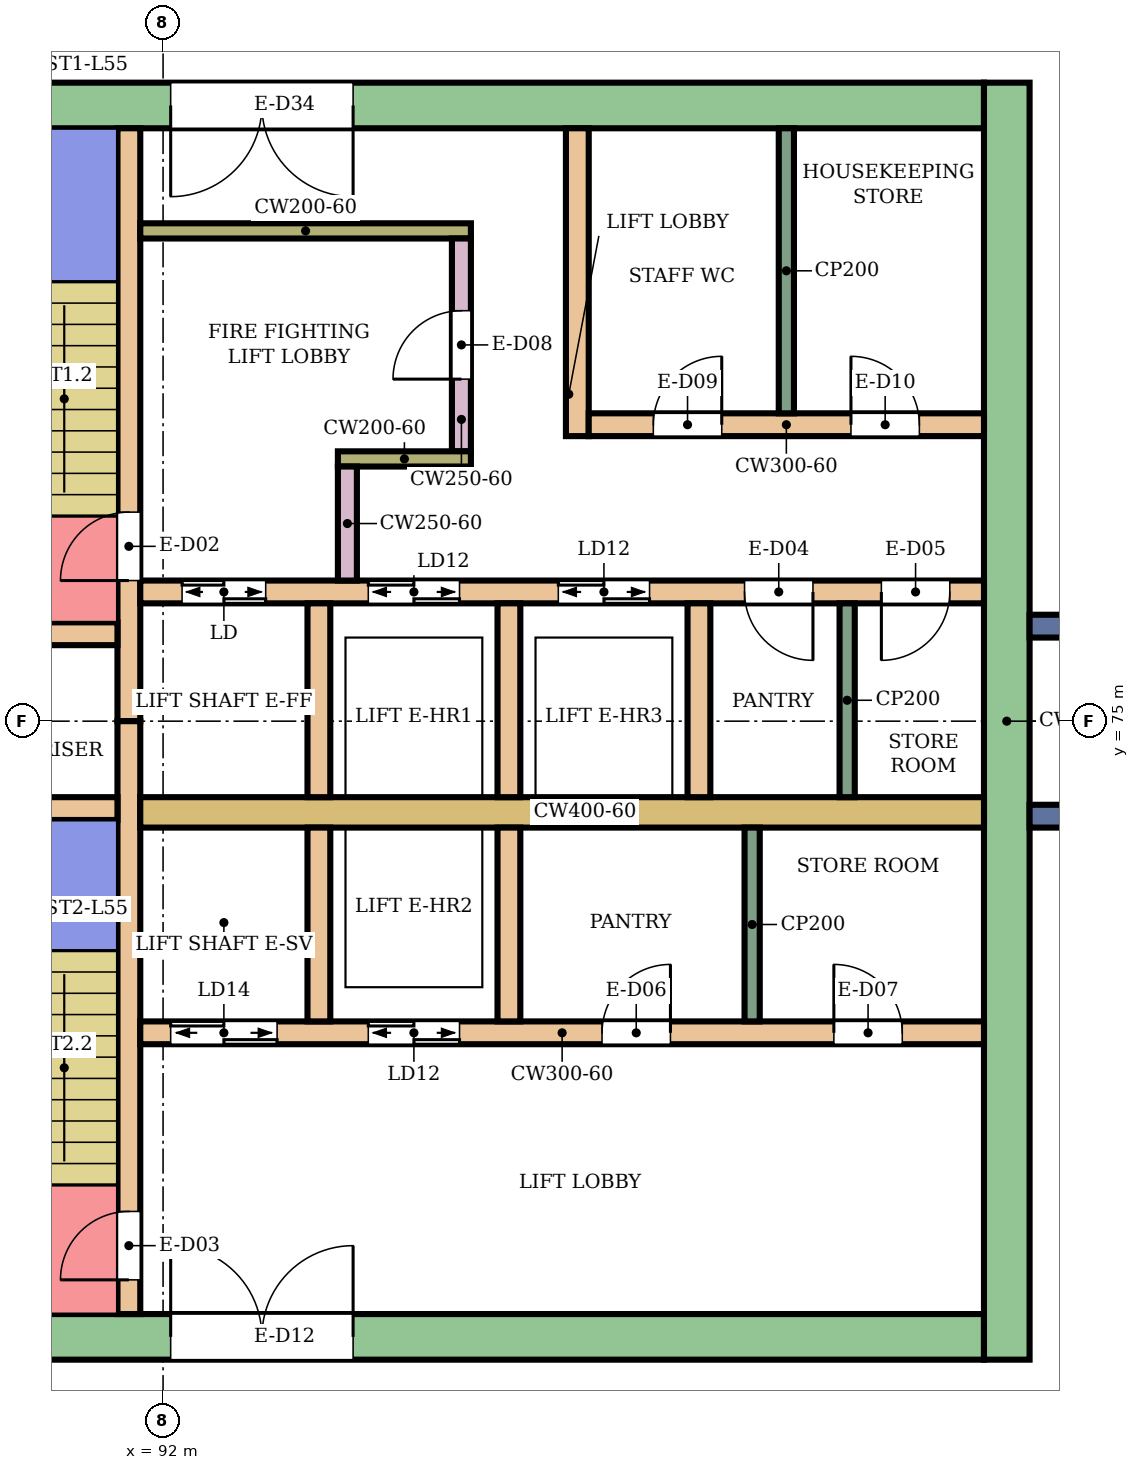
"""IFC4 building model, lengths in metres.
Left out: names, types, materials, properties, quantities, classifications, styles, units other than length and angle.
Written with IfcOpenShell. Run it as: python <this file> out.ifc"""

import sys

from ifc_helpers import new_model, si_unit, direction, frame, frame_2d, origin, place, context, subcontext, project, spatial, rectangle, extrude, element, fill, save


model = new_model("IFC4")
c1 = context("Model", 3, precision=1e-05, world=origin(), true_north=direction((0.0, 1.0)))
c2 = subcontext(c1, "Body", "Model", "MODEL_VIEW")
j1 = project(units=[si_unit("LENGTHUNIT", "METRE"), si_unit("PLANEANGLEUNIT", "RADIAN")], contexts=[c1])
p1 = place(None, origin())
s1 = spatial("IfcSite", under=j1, at=p1, CompositionType="ELEMENT")
p2 = place(p1, origin())
s2 = spatial("IfcBuilding", under=s1, at=p2, CompositionType="ELEMENT")
p3 = place(p2, frame((0.0, 0.0, 241.5)))
s3 = spatial("IfcBuildingStorey", under=s2, at=p3, CompositionType="ELEMENT", Elevation=241.5)
p4 = place(p3, frame((87.9, 83.1, 0.0), z_axis=(0.0, 0.0, 1.0), x_axis=(1.0, 0.0, 0.0)))
e1 = element("IfcWall", 1, at=p4, inside=s3, PredefinedType="SHEAR", context=c2, shape_type="SweptSolid", body=[
    extrude(rectangle(XDim=14.9, YDim=0.6, at=frame_2d((7.45, 0.0))), origin(), (0.0, 0.0, 1.0), 3.88),
])
p5 = place(p4, frame((4.2, 0.0, 0.0)))
e2 = element("IfcOpeningElement", 2, at=p5, cuts=e1, PredefinedType="OPENING", context=c2, shape_type="SweptSolid", body=[
    extrude(rectangle(XDim=2.4, YDim=2.4, at=frame_2d((1.2, 1.2))), frame((0.0, 0.31, 0.0), z_axis=(0.0, -1.0, 0.0), x_axis=(1.0, 0.0, 0.0)), (0.0, 0.0, 1.0), 0.62),
])
p6 = place(p3, frame((87.9, 66.9, 0.0), z_axis=(0.0, 0.0, 1.0), x_axis=(1.0, 0.0, 0.0)))
e3 = element("IfcWall", 3, at=p6, inside=s3, PredefinedType="SHEAR", context=c2, shape_type="SweptSolid", body=[
    extrude(rectangle(XDim=14.9, YDim=0.6, at=frame_2d((7.45, 0.0))), origin(), (0.0, 0.0, 1.0), 3.88),
])
p7 = place(p6, frame((4.2, 0.0, 0.0)))
e4 = element("IfcOpeningElement", 4, at=p7, cuts=e3, PredefinedType="OPENING", context=c2, shape_type="SweptSolid", body=[
    extrude(rectangle(XDim=2.4, YDim=2.4, at=frame_2d((1.2, 1.2))), frame((0.0, 0.31, 0.0), z_axis=(0.0, -1.0, 0.0), x_axis=(1.0, 0.0, 0.0)), (0.0, 0.0, 1.0), 0.62),
])
p8 = place(p3, frame((103.1, 66.6, 0.0), z_axis=(0.0, 0.0, 1.0), x_axis=(0.0, 1.0, 0.0)))
e5 = element("IfcWall", 5, at=p8, inside=s3, PredefinedType="SHEAR", context=c2, shape_type="SweptSolid", body=[
    extrude(rectangle(XDim=16.8, YDim=0.6, at=frame_2d((8.4, 0.0))), origin(), (0.0, 0.0, 1.0), 3.88),
])
p9 = place(p3, frame((91.55, 75.0, 0.0), z_axis=(0.0, 0.0, 1.0), x_axis=(0.0, 1.0, 0.0)))
e6 = element("IfcWall", 6, at=p9, inside=s3, PredefinedType="SHEAR", context=c2, shape_type="SweptSolid", body=[
    extrude(rectangle(XDim=7.8, YDim=0.3, at=frame_2d((3.9, 0.0))), origin(), (0.0, 0.0, 1.0), 3.88),
])
p10 = place(p9, frame((1.85, 0.0, 0.0)))
e7 = element("IfcOpeningElement", 7, at=p10, cuts=e6, PredefinedType="OPENING", context=c2, shape_type="SweptSolid", body=[
    extrude(rectangle(XDim=0.9, YDim=2.1, at=frame_2d((0.45, 1.05))), frame((0.0, 0.16, 0.0), z_axis=(0.0, -1.0, 0.0), x_axis=(1.0, 0.0, 0.0)), (0.0, 0.0, 1.0), 0.32),
])
p11 = place(p3, frame((91.55, 67.2, 0.0), z_axis=(0.0, 0.0, 1.0), x_axis=(0.0, 1.0, 0.0)))
e8 = element("IfcWall", 8, at=p11, inside=s3, PredefinedType="SHEAR", context=c2, shape_type="SweptSolid", body=[
    extrude(rectangle(XDim=7.8, YDim=0.3, at=frame_2d((3.9, 0.0))), origin(), (0.0, 0.0, 1.0), 3.88),
])
p12 = place(p11, frame((0.45, 0.0, 0.0)))
e9 = element("IfcOpeningElement", 9, at=p12, cuts=e8, PredefinedType="OPENING", context=c2, shape_type="SweptSolid", body=[
    extrude(rectangle(XDim=0.9, YDim=2.1, at=frame_2d((0.45, 1.05))), frame((0.0, 0.16, 0.0), z_axis=(0.0, -1.0, 0.0), x_axis=(1.0, 0.0, 0.0)), (0.0, 0.0, 1.0), 0.32),
])
p13 = place(p3, frame((88.35, 76.15, 0.0), z_axis=(0.0, 0.0, 1.0), x_axis=(1.0, 0.0, 0.0)))
e10 = element("IfcWall", 10, at=p13, inside=s3, PredefinedType="SHEAR", context=c2, shape_type="SweptSolid", body=[
    extrude(rectangle(XDim=3.05, YDim=0.3, at=frame_2d((1.525, 0.0))), origin(), (0.0, 0.0, 1.0), 3.88),
])
p14 = place(p13, frame((1.1, 0.0, 0.0)))
e11 = element("IfcOpeningElement", 11, at=p14, cuts=e10, PredefinedType="OPENING", context=c2, shape_type="SweptSolid", body=[
    extrude(rectangle(XDim=0.7, YDim=2.0, at=frame_2d((0.35, 1.0))), frame((0.0, 0.16, 0.0), z_axis=(0.0, -1.0, 0.0), x_axis=(1.0, 0.0, 0.0)), (0.0, 0.0, 1.0), 0.32),
])
p15 = place(p3, frame((88.35, 73.85, 0.0), z_axis=(0.0, 0.0, 1.0), x_axis=(1.0, 0.0, 0.0)))
e12 = element("IfcWall", 12, at=p15, inside=s3, PredefinedType="SHEAR", context=c2, shape_type="SweptSolid", body=[
    extrude(rectangle(XDim=3.05, YDim=0.3, at=frame_2d((1.525, 0.0))), origin(), (0.0, 0.0, 1.0), 3.88),
])
p16 = place(p3, frame((91.7, 76.7, 0.0), z_axis=(0.0, 0.0, 1.0), x_axis=(1.0, 0.0, 0.0)))
e13 = element("IfcWall", 13, at=p16, inside=s3, PredefinedType="SHEAR", context=c2, shape_type="SweptSolid", body=[
    extrude(rectangle(XDim=11.1, YDim=0.3, at=frame_2d((5.55, 0.0))), origin(), (0.0, 0.0, 1.0), 3.88),
])
p17 = place(p16, frame((0.55, 0.0, 0.0)))
e14 = element("IfcOpeningElement", 14, at=p17, cuts=e13, PredefinedType="OPENING", context=c2, shape_type="SweptSolid", body=[
    extrude(rectangle(XDim=1.1, YDim=2.1, at=frame_2d((0.55, 1.05))), frame((0.0, 0.16, 0.0), z_axis=(0.0, -1.0, 0.0), x_axis=(1.0, 0.0, 0.0)), (0.0, 0.0, 1.0), 0.32),
])
p18 = place(p16, frame((3.0, 0.0, 0.0)))
e15 = element("IfcOpeningElement", 15, at=p18, cuts=e13, PredefinedType="OPENING", context=c2, shape_type="SweptSolid", body=[
    extrude(rectangle(XDim=1.2, YDim=2.1, at=frame_2d((0.6, 1.05))), frame((0.0, 0.16, 0.0), z_axis=(0.0, -1.0, 0.0), x_axis=(1.0, 0.0, 0.0)), (0.0, 0.0, 1.0), 0.32),
])
p19 = place(p16, frame((5.5, 0.0, 0.0)))
e16 = element("IfcOpeningElement", 16, at=p19, cuts=e13, PredefinedType="OPENING", context=c2, shape_type="SweptSolid", body=[
    extrude(rectangle(XDim=1.2, YDim=2.1, at=frame_2d((0.6, 1.05))), frame((0.0, 0.16, 0.0), z_axis=(0.0, -1.0, 0.0), x_axis=(1.0, 0.0, 0.0)), (0.0, 0.0, 1.0), 0.32),
])
p20 = place(p16, frame((7.95, 0.0, 0.0)))
e17 = element("IfcOpeningElement", 17, at=p20, cuts=e13, PredefinedType="OPENING", context=c2, shape_type="SweptSolid", body=[
    extrude(rectangle(XDim=0.9, YDim=2.1, at=frame_2d((0.45, 1.05))), frame((0.0, 0.16, 0.0), z_axis=(0.0, -1.0, 0.0), x_axis=(1.0, 0.0, 0.0)), (0.0, 0.0, 1.0), 0.32),
])
p21 = place(p16, frame((9.75, 0.0, 0.0)))
e18 = element("IfcOpeningElement", 18, at=p21, cuts=e13, PredefinedType="OPENING", context=c2, shape_type="SweptSolid", body=[
    extrude(rectangle(XDim=0.9, YDim=2.1, at=frame_2d((0.45, 1.05))), frame((0.0, 0.16, 0.0), z_axis=(0.0, -1.0, 0.0), x_axis=(1.0, 0.0, 0.0)), (0.0, 0.0, 1.0), 0.32),
])
p22 = place(p3, frame((91.7, 73.8, 0.0), z_axis=(0.0, 0.0, 1.0), x_axis=(1.0, 0.0, 0.0)))
e19 = element("IfcWall", 19, at=p22, inside=s3, PredefinedType="SHEAR", context=c2, shape_type="SweptSolid", body=[
    extrude(rectangle(XDim=11.1, YDim=0.4, at=frame_2d((5.55, 0.0))), origin(), (0.0, 0.0, 1.0), 3.88),
])
p23 = place(p3, frame((91.7, 70.9, 0.0), z_axis=(0.0, 0.0, 1.0), x_axis=(1.0, 0.0, 0.0)))
e20 = element("IfcWall", 20, at=p23, inside=s3, PredefinedType="SHEAR", context=c2, shape_type="SweptSolid", body=[
    extrude(rectangle(XDim=11.1, YDim=0.3, at=frame_2d((5.55, 0.0))), origin(), (0.0, 0.0, 1.0), 3.88),
])
p24 = place(p23, frame((0.4, 0.0, 0.0)))
e21 = element("IfcOpeningElement", 21, at=p24, cuts=e20, PredefinedType="OPENING", context=c2, shape_type="SweptSolid", body=[
    extrude(rectangle(XDim=1.4, YDim=2.1, at=frame_2d((0.7, 1.05))), frame((0.0, 0.16, 0.0), z_axis=(0.0, -1.0, 0.0), x_axis=(1.0, 0.0, 0.0)), (0.0, 0.0, 1.0), 0.32),
])
p25 = place(p23, frame((3.0, 0.0, 0.0)))
e22 = element("IfcOpeningElement", 22, at=p25, cuts=e20, PredefinedType="OPENING", context=c2, shape_type="SweptSolid", body=[
    extrude(rectangle(XDim=1.2, YDim=2.1, at=frame_2d((0.6, 1.05))), frame((0.0, 0.16, 0.0), z_axis=(0.0, -1.0, 0.0), x_axis=(1.0, 0.0, 0.0)), (0.0, 0.0, 1.0), 0.32),
])
p26 = place(p23, frame((6.075, 0.0, 0.0)))
e23 = element("IfcOpeningElement", 23, at=p26, cuts=e20, PredefinedType="OPENING", context=c2, shape_type="SweptSolid", body=[
    extrude(rectangle(XDim=0.9, YDim=2.1, at=frame_2d((0.45, 1.05))), frame((0.0, 0.16, 0.0), z_axis=(0.0, -1.0, 0.0), x_axis=(1.0, 0.0, 0.0)), (0.0, 0.0, 1.0), 0.32),
])
p27 = place(p23, frame((9.125, 0.0, 0.0)))
e24 = element("IfcOpeningElement", 24, at=p27, cuts=e20, PredefinedType="OPENING", context=c2, shape_type="SweptSolid", body=[
    extrude(rectangle(XDim=0.9, YDim=2.1, at=frame_2d((0.45, 1.05))), frame((0.0, 0.16, 0.0), z_axis=(0.0, -1.0, 0.0), x_axis=(1.0, 0.0, 0.0)), (0.0, 0.0, 1.0), 0.32),
])
for number, where, z_axis, x_axis in (
    (25, (94.05, 74.0, 0.0), (0.0, 0.0, 1.0), (0.0, 1.0, 0.0)),
    (26, (96.55, 74.0, 0.0), (0.0, 0.0, 1.0), (0.0, 1.0, 0.0)),
    (27, (99.05, 74.0, 0.0), (0.0, 0.0, 1.0), (0.0, 1.0, 0.0)),
    (28, (94.05, 71.05, 0.0), (0.0, 0.0, 1.0), (0.0, 1.0, 0.0)),
    (29, (96.55, 71.05, 0.0), (0.0, 0.0, 1.0), (0.0, 1.0, 0.0)),
):
    element("IfcWall", number, at=place(p3, frame(where, z_axis=z_axis, x_axis=x_axis)), inside=s3, PredefinedType="SHEAR", context=c2, shape_type="SweptSolid", body=[
        extrude(rectangle(XDim=2.55, YDim=0.3, at=frame_2d((1.275, 0.0))), origin(), (0.0, 0.0, 1.0), 3.88),
    ])
p28 = place(p3, frame((91.7, 81.45, 0.0), z_axis=(0.0, 0.0, 1.0), x_axis=(1.0, 0.0, 0.0)))
e30 = element("IfcWall", 30, at=p28, inside=s3, PredefinedType="SHEAR", context=c2, shape_type="SweptSolid", body=[
    extrude(rectangle(XDim=4.35, YDim=0.2, at=frame_2d((2.175, 0.0))), origin(), (0.0, 0.0, 1.0), 3.88),
])
p29 = place(p3, frame((95.925, 78.55, 0.0), z_axis=(0.0, 0.0, 1.0), x_axis=(0.0, 1.0, 0.0)))
e31 = element("IfcWall", 31, at=p29, inside=s3, PredefinedType="SHEAR", context=c2, shape_type="SweptSolid", body=[
    extrude(rectangle(XDim=2.8, YDim=0.25, at=frame_2d((1.4, 0.0))), origin(), (0.0, 0.0, 1.0), 3.88),
])
p30 = place(p29, frame((0.95, 0.0, 0.0)))
e32 = element("IfcOpeningElement", 32, at=p30, cuts=e31, PredefinedType="OPENING", context=c2, shape_type="SweptSolid", body=[
    extrude(rectangle(XDim=0.9, YDim=2.1, at=frame_2d((0.45, 1.05))), frame((0.0, 0.135, 0.0), z_axis=(0.0, -1.0, 0.0), x_axis=(1.0, 0.0, 0.0)), (0.0, 0.0, 1.0), 0.27),
])
p31 = place(p3, frame((94.3, 78.45, 0.0), z_axis=(0.0, 0.0, 1.0), x_axis=(1.0, 0.0, 0.0)))
e33 = element("IfcWall", 33, at=p31, inside=s3, PredefinedType="SHEAR", context=c2, shape_type="SweptSolid", body=[
    extrude(rectangle(XDim=1.75, YDim=0.2, at=frame_2d((0.875, 0.0))), origin(), (0.0, 0.0, 1.0), 3.88),
])
p32 = place(p3, frame((94.425, 76.85, 0.0), z_axis=(0.0, 0.0, 1.0), x_axis=(0.0, 1.0, 0.0)))
e34 = element("IfcWall", 34, at=p32, inside=s3, PredefinedType="SHEAR", context=c2, shape_type="SweptSolid", body=[
    extrude(rectangle(XDim=1.5, YDim=0.25, at=frame_2d((0.75, 0.0))), origin(), (0.0, 0.0, 1.0), 3.88),
])
p33 = place(p3, frame((97.45, 78.75, 0.0), z_axis=(0.0, 0.0, 1.0), x_axis=(0.0, 1.0, 0.0)))
e35 = element("IfcWall", 35, at=p33, inside=s3, PredefinedType="SHEAR", context=c2, shape_type="SweptSolid", body=[
    extrude(rectangle(XDim=4.05, YDim=0.3, at=frame_2d((2.025, 0.0))), origin(), (0.0, 0.0, 1.0), 3.88),
])
p34 = place(p3, frame((97.6, 78.9, 0.0), z_axis=(0.0, 0.0, 1.0), x_axis=(1.0, 0.0, 0.0)))
e36 = element("IfcWall", 36, at=p34, inside=s3, PredefinedType="SHEAR", context=c2, shape_type="SweptSolid", body=[
    extrude(rectangle(XDim=5.2, YDim=0.3, at=frame_2d((2.6, 0.0))), origin(), (0.0, 0.0, 1.0), 3.88),
])
p35 = place(p34, frame((0.85, 0.0, 0.0)))
e37 = element("IfcOpeningElement", 37, at=p35, cuts=e36, PredefinedType="OPENING", context=c2, shape_type="SweptSolid", body=[
    extrude(rectangle(XDim=0.9, YDim=2.1, at=frame_2d((0.45, 1.05))), frame((0.0, 0.16, 0.0), z_axis=(0.0, -1.0, 0.0), x_axis=(1.0, 0.0, 0.0)), (0.0, 0.0, 1.0), 0.32),
])
p36 = place(p34, frame((3.45, 0.0, 0.0)))
e38 = element("IfcOpeningElement", 38, at=p36, cuts=e36, PredefinedType="OPENING", context=c2, shape_type="SweptSolid", body=[
    extrude(rectangle(XDim=0.9, YDim=2.1, at=frame_2d((0.45, 1.05))), frame((0.0, 0.16, 0.0), z_axis=(0.0, -1.0, 0.0), x_axis=(1.0, 0.0, 0.0)), (0.0, 0.0, 1.0), 0.32),
])
for number, where, z_axis, x_axis in (
    (39, (103.4, 73.75, 0.0), (0.0, 0.0, 1.0), (1.0, 0.0, 0.0)),
    (40, (103.4, 76.25, 0.0), (0.0, 0.0, 1.0), (1.0, 0.0, 0.0)),
):
    element("IfcWall", number, at=place(p3, frame(where, z_axis=z_axis, x_axis=x_axis)), inside=s3, PredefinedType="NOTDEFINED", context=c2, shape_type="SweptSolid", body=[
        extrude(rectangle(XDim=2.416, YDim=0.3, at=frame_2d((1.208, 0.0))), origin(), (0.0, 0.0, 1.0), 4.2),
    ])
for number, where, z_axis, x_axis in (
    (41, (101.0, 74.0, 0.0), (0.0, 0.0, 1.0), (0.0, 1.0, 0.0)),
    (42, (99.75, 71.05, 0.0), (0.0, 0.0, 1.0), (0.0, 1.0, 0.0)),
):
    element("IfcWall", number, at=place(p3, frame(where, z_axis=z_axis, x_axis=x_axis)), inside=s3, PredefinedType="PARTITIONING", context=c2, shape_type="SweptSolid", body=[
        extrude(rectangle(XDim=2.55, YDim=0.2, at=frame_2d((1.275, 0.0))), origin(), (0.0, 0.0, 1.0), 3.88),
    ])
p37 = place(p3, frame((100.2, 79.05, 0.0), z_axis=(0.0, 0.0, 1.0), x_axis=(0.0, 1.0, 0.0)))
e43 = element("IfcWall", 43, at=p37, inside=s3, PredefinedType="PARTITIONING", context=c2, shape_type="SweptSolid", body=[
    extrude(rectangle(XDim=3.75, YDim=0.2, at=frame_2d((1.875, 0.0))), origin(), (0.0, 0.0, 1.0), 3.88),
])
p38 = place(p10, origin())
e44 = element("IfcDoor", 44, at=p38, inside=s3, OperationType="SINGLE_SWING_LEFT", PredefinedType="DOOR", context=c2, shape_type="SweptSolid", body=[
    extrude(rectangle(XDim=0.9, YDim=2.1, at=frame_2d((0.45, 1.05))), frame((0.0, 0.025, 0.0), z_axis=(0.0, -1.0, 0.0), x_axis=(1.0, 0.0, 0.0)), (0.0, 0.0, 1.0), 0.05),
])
fill(e7, e44)
p39 = place(p12, origin())
e45 = element("IfcDoor", 45, at=p39, inside=s3, OperationType="SINGLE_SWING_LEFT", PredefinedType="DOOR", context=c2, shape_type="SweptSolid", body=[
    extrude(rectangle(XDim=0.9, YDim=2.1, at=frame_2d((0.45, 1.05))), frame((0.0, 0.025, 0.0), z_axis=(0.0, -1.0, 0.0), x_axis=(1.0, 0.0, 0.0)), (0.0, 0.0, 1.0), 0.05),
])
fill(e9, e45)
p40 = place(p17, origin())
e46 = element("IfcDoor", 46, at=p40, inside=s3, OperationType="DOUBLE_DOOR_SLIDING", PredefinedType="DOOR", context=c2, shape_type="SweptSolid", body=[
    extrude(rectangle(XDim=1.1, YDim=2.1, at=frame_2d((0.55, 1.05))), frame((0.0, 0.025, 0.0), z_axis=(0.0, -1.0, 0.0), x_axis=(1.0, 0.0, 0.0)), (0.0, 0.0, 1.0), 0.05),
])
fill(e14, e46)
p41 = place(p18, origin())
e47 = element("IfcDoor", 47, at=p41, inside=s3, OperationType="DOUBLE_DOOR_SLIDING", PredefinedType="DOOR", context=c2, shape_type="SweptSolid", body=[
    extrude(rectangle(XDim=1.2, YDim=2.1, at=frame_2d((0.6, 1.05))), frame((0.0, 0.025, 0.0), z_axis=(0.0, -1.0, 0.0), x_axis=(1.0, 0.0, 0.0)), (0.0, 0.0, 1.0), 0.05),
])
fill(e15, e47)
p42 = place(p19, origin())
e48 = element("IfcDoor", 48, at=p42, inside=s3, OperationType="DOUBLE_DOOR_SLIDING", PredefinedType="DOOR", context=c2, shape_type="SweptSolid", body=[
    extrude(rectangle(XDim=1.2, YDim=2.1, at=frame_2d((0.6, 1.05))), frame((0.0, 0.025, 0.0), z_axis=(0.0, -1.0, 0.0), x_axis=(1.0, 0.0, 0.0)), (0.0, 0.0, 1.0), 0.05),
])
fill(e16, e48)
p43 = place(p20, frame((0.9, 0.0, 0.0), z_axis=(0.0, 0.0, 1.0), x_axis=(-1.0, 0.0, 0.0)))
e49 = element("IfcDoor", 49, at=p43, inside=s3, OperationType="SINGLE_SWING_LEFT", PredefinedType="DOOR", context=c2, shape_type="SweptSolid", body=[
    extrude(rectangle(XDim=0.9, YDim=2.1, at=frame_2d((0.45, 1.05))), frame((0.0, 0.025, 0.0), z_axis=(0.0, -1.0, 0.0), x_axis=(1.0, 0.0, 0.0)), (0.0, 0.0, 1.0), 0.05),
])
fill(e17, e49)
p44 = place(p21, frame((0.9, 0.0, 0.0), z_axis=(0.0, 0.0, 1.0), x_axis=(-1.0, 0.0, 0.0)))
e50 = element("IfcDoor", 50, at=p44, inside=s3, OperationType="SINGLE_SWING_RIGHT", PredefinedType="DOOR", context=c2, shape_type="SweptSolid", body=[
    extrude(rectangle(XDim=0.9, YDim=2.1, at=frame_2d((0.45, 1.05))), frame((0.0, 0.025, 0.0), z_axis=(0.0, -1.0, 0.0), x_axis=(1.0, 0.0, 0.0)), (0.0, 0.0, 1.0), 0.05),
])
fill(e18, e50)
p45 = place(p24, origin())
e51 = element("IfcDoor", 51, at=p45, inside=s3, OperationType="DOUBLE_DOOR_SLIDING", PredefinedType="DOOR", context=c2, shape_type="SweptSolid", body=[
    extrude(rectangle(XDim=1.4, YDim=2.1, at=frame_2d((0.7, 1.05))), frame((0.0, 0.025, 0.0), z_axis=(0.0, -1.0, 0.0), x_axis=(1.0, 0.0, 0.0)), (0.0, 0.0, 1.0), 0.05),
])
fill(e21, e51)
p46 = place(p25, origin())
e52 = element("IfcDoor", 52, at=p46, inside=s3, OperationType="DOUBLE_DOOR_SLIDING", PredefinedType="DOOR", context=c2, shape_type="SweptSolid", body=[
    extrude(rectangle(XDim=1.2, YDim=2.1, at=frame_2d((0.6, 1.05))), frame((0.0, 0.025, 0.0), z_axis=(0.0, -1.0, 0.0), x_axis=(1.0, 0.0, 0.0)), (0.0, 0.0, 1.0), 0.05),
])
fill(e22, e52)
p47 = place(p26, origin())
e53 = element("IfcDoor", 53, at=p47, inside=s3, OperationType="SINGLE_SWING_RIGHT", PredefinedType="DOOR", context=c2, shape_type="SweptSolid", body=[
    extrude(rectangle(XDim=0.9, YDim=2.1, at=frame_2d((0.45, 1.05))), frame((0.0, 0.025, 0.0), z_axis=(0.0, -1.0, 0.0), x_axis=(1.0, 0.0, 0.0)), (0.0, 0.0, 1.0), 0.05),
])
fill(e23, e53)
p48 = place(p27, origin())
e54 = element("IfcDoor", 54, at=p48, inside=s3, OperationType="SINGLE_SWING_LEFT", PredefinedType="DOOR", context=c2, shape_type="SweptSolid", body=[
    extrude(rectangle(XDim=0.9, YDim=2.1, at=frame_2d((0.45, 1.05))), frame((0.0, 0.025, 0.0), z_axis=(0.0, -1.0, 0.0), x_axis=(1.0, 0.0, 0.0)), (0.0, 0.0, 1.0), 0.05),
])
fill(e24, e54)
p49 = place(p30, origin())
e55 = element("IfcDoor", 55, at=p49, inside=s3, OperationType="SINGLE_SWING_LEFT", PredefinedType="DOOR", context=c2, shape_type="SweptSolid", body=[
    extrude(rectangle(XDim=0.9, YDim=2.1, at=frame_2d((0.45, 1.05))), frame((0.0, 0.025, 0.0), z_axis=(0.0, -1.0, 0.0), x_axis=(1.0, 0.0, 0.0)), (0.0, 0.0, 1.0), 0.05),
])
fill(e32, e55)
p50 = place(p35, origin())
e56 = element("IfcDoor", 56, at=p50, inside=s3, OperationType="SINGLE_SWING_RIGHT", PredefinedType="DOOR", context=c2, shape_type="SweptSolid", body=[
    extrude(rectangle(XDim=0.9, YDim=2.1, at=frame_2d((0.45, 1.05))), frame((0.0, 0.025, 0.0), z_axis=(0.0, -1.0, 0.0), x_axis=(1.0, 0.0, 0.0)), (0.0, 0.0, 1.0), 0.05),
])
fill(e37, e56)
p51 = place(p36, origin())
e57 = element("IfcDoor", 57, at=p51, inside=s3, OperationType="SINGLE_SWING_LEFT", PredefinedType="DOOR", context=c2, shape_type="SweptSolid", body=[
    extrude(rectangle(XDim=0.9, YDim=2.1, at=frame_2d((0.45, 1.05))), frame((0.0, 0.025, 0.0), z_axis=(0.0, -1.0, 0.0), x_axis=(1.0, 0.0, 0.0)), (0.0, 0.0, 1.0), 0.05),
])
fill(e38, e57)
p52 = place(p5, frame((2.4, 0.0, 0.0), z_axis=(0.0, 0.0, 1.0), x_axis=(-1.0, 0.0, 0.0)))
e58 = element("IfcDoor", 58, at=p52, inside=s3, OperationType="DOUBLE_DOOR_SINGLE_SWING", PredefinedType="DOOR", context=c2, shape_type="SweptSolid", body=[
    extrude(rectangle(XDim=2.4, YDim=2.4, at=frame_2d((1.2, 1.2))), frame((0.0, 0.025, 0.0), z_axis=(0.0, -1.0, 0.0), x_axis=(1.0, 0.0, 0.0)), (0.0, 0.0, 1.0), 0.05),
])
fill(e2, e58)
p53 = place(p7, origin())
e59 = element("IfcDoor", 59, at=p53, inside=s3, OperationType="DOUBLE_DOOR_SINGLE_SWING", PredefinedType="DOOR", context=c2, shape_type="SweptSolid", body=[
    extrude(rectangle(XDim=2.4, YDim=2.4, at=frame_2d((1.2, 1.2))), frame((0.0, 0.025, 0.0), z_axis=(0.0, -1.0, 0.0), x_axis=(1.0, 0.0, 0.0)), (0.0, 0.0, 1.0), 0.05),
])
fill(e4, e59)
save(model, sys.argv[1])
